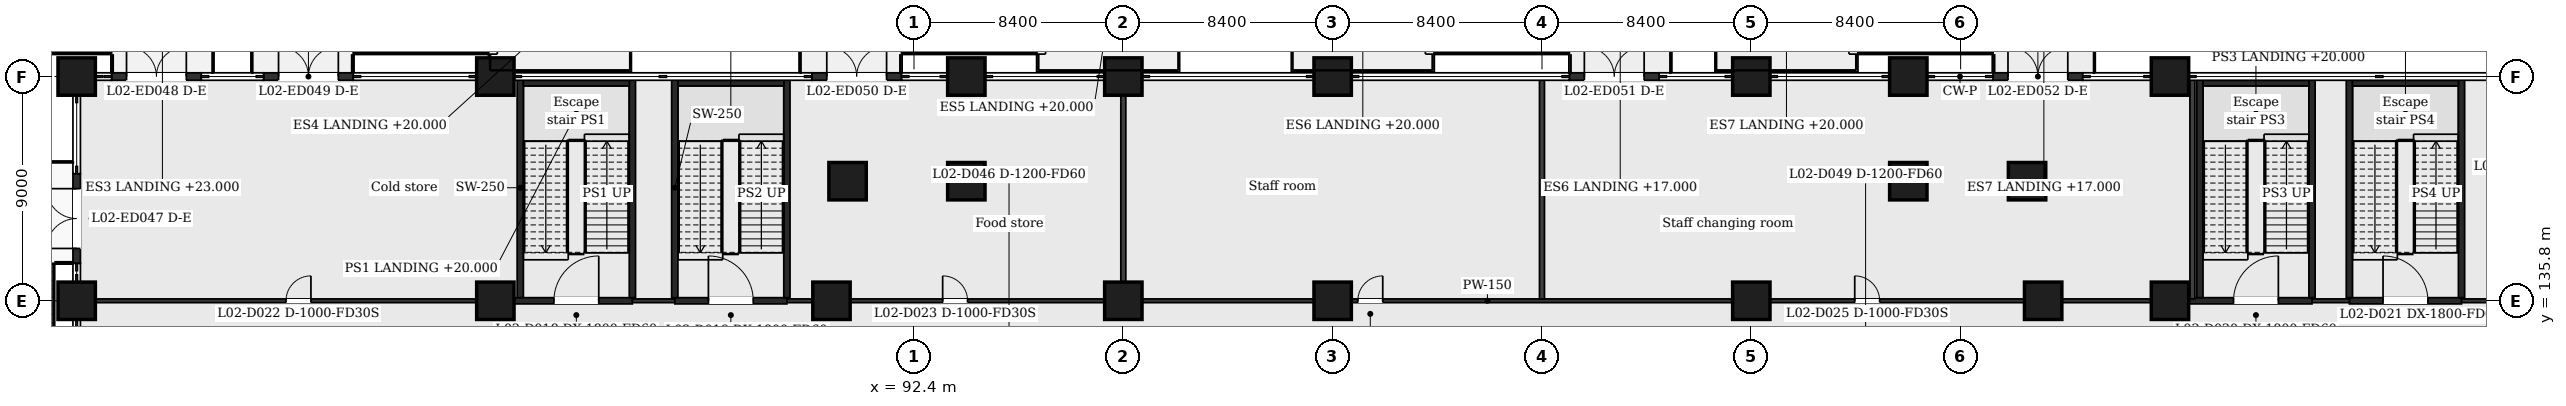
"""IFC4 building model, lengths in metres.
Left out: names, types, materials, properties, quantities, classifications, styles, units other than length and angle.
Written with IfcOpenShell. Run it as: python <this file> out.ifc"""

import sys

from ifc_helpers import new_model, si_unit, direction, frame, frame_2d, origin, origin_2d, place, context, subcontext, project, spatial, rectangle, extrude, element, fill, save


model = new_model("IFC4")
c1 = context("Model", 3, precision=1e-05, world=origin(), true_north=direction((0.0, 1.0)))
c2 = subcontext(c1, "Body", "Model", "MODEL_VIEW")
j1 = project(units=[si_unit("LENGTHUNIT", "METRE"), si_unit("PLANEANGLEUNIT", "RADIAN")], contexts=[c1])
p1 = place(None, origin())
s1 = spatial("IfcSite", under=j1, at=p1, CompositionType="ELEMENT")
p2 = place(p1, origin())
s2 = spatial("IfcBuilding", under=s1, at=p2, CompositionType="ELEMENT")
p3 = place(p2, frame((0.0, 0.0, 17.0)))
s3 = spatial("IfcBuildingStorey", under=s2, at=p3, CompositionType="ELEMENT", Elevation=17.0)
for number, where, z_axis, x_axis in (
    (1, (58.8, 135.8, 0.0), (0.0, 0.0, 1.0), (1.0, 0.0, 0.0)),
    (2, (75.6, 135.8, 0.0), (0.0, 0.0, 1.0), (1.0, 0.0, 0.0)),
    (3, (89.088, 135.8, 0.0), (0.0, 0.0, 1.0), (1.0, 0.0, 0.0)),
    (4, (100.8, 135.8, 0.0), (0.0, 0.0, 1.0), (1.0, 0.0, 0.0)),
    (5, (109.2, 135.8, 0.0), (0.0, 0.0, 1.0), (1.0, 0.0, 0.0)),
    (6, (126.0, 135.8, 0.0), (0.0, 0.0, 1.0), (1.0, 0.0, 0.0)),
    (7, (137.711, 135.8, 0.0), (0.0, 0.0, 1.0), (1.0, 0.0, 0.0)),
    (8, (142.8, 135.8, 0.0), (0.0, 0.0, 1.0), (1.0, 0.0, 0.0)),
    (9, (89.735, 140.6, 0.0), (0.0, 0.0, 1.0), (1.0, 0.0, 0.0)),
    (10, (94.5, 140.6, 0.0), (0.0, 0.0, 1.0), (1.0, 0.0, 0.0)),
    (11, (132.3, 140.6, 0.0), (0.0, 0.0, 1.0), (1.0, 0.0, 0.0)),
    (12, (137.065, 140.6, 0.0), (0.0, 0.0, 1.0), (1.0, 0.0, 0.0)),
    (13, (58.8, 144.8, 0.0), (0.0, 0.0, 1.0), (1.0, 0.0, 0.0)),
    (14, (75.6, 144.8, 0.0), (0.0, 0.0, 1.0), (1.0, 0.0, 0.0)),
    (15, (94.5, 144.8, 0.0), (0.0, 0.0, 1.0), (1.0, 0.0, 0.0)),
    (16, (100.8, 144.8, 0.0), (0.0, 0.0, 1.0), (1.0, 0.0, 0.0)),
    (17, (109.2, 144.8, 0.0), (0.0, 0.0, 1.0), (1.0, 0.0, 0.0)),
    (18, (126.0, 144.8, 0.0), (0.0, 0.0, 1.0), (1.0, 0.0, 0.0)),
    (19, (132.3, 144.8, 0.0), (0.0, 0.0, 1.0), (1.0, 0.0, 0.0)),
    (20, (142.8, 144.8, 0.0), (0.0, 0.0, 1.0), (1.0, 0.0, 0.0)),
):
    element("IfcColumn", number, at=place(p3, frame(where, z_axis=z_axis, x_axis=x_axis)), inside=s3, PredefinedType="COLUMN", context=c2, shape_type="SweptSolid", body=[
        extrude(rectangle(XDim=1.5, YDim=1.5, at=origin_2d()), origin(), (0.0, 0.0, 1.0), 6.0),
    ])
p4 = place(p3, frame((58.8, 137.3, 0.0), z_axis=(0.0, 0.0, 1.0), x_axis=(0.0, 1.0, 0.0)))
e21 = element("IfcWall", 21, at=p4, inside=s3, PredefinedType="SOLIDWALL", context=c2, shape_type="SweptSolid", body=[
    extrude(rectangle(XDim=3.6, YDim=0.3, at=frame_2d((1.8, 0.0))), origin(), (0.0, 0.0, 1.0), 5.1),
])
p5 = place(p4, frame((0.6, 0.0, 0.0)))
e22 = element("IfcOpeningElement", 22, at=p5, cuts=e21, PredefinedType="OPENING", context=c2, shape_type="SweptSolid", body=[
    extrude(rectangle(XDim=2.4, YDim=2.4, at=frame_2d((1.2, 1.2))), frame((0.0, 0.16, 0.0), z_axis=(0.0, -1.0, 0.0), x_axis=(1.0, 0.0, 0.0)), (0.0, 0.0, 1.0), 0.32),
])
p6 = place(p3, frame((60.2, 144.8, 0.0), z_axis=(0.0, 0.0, 1.0), x_axis=(1.0, 0.0, 0.0)))
e23 = element("IfcWall", 23, at=p6, inside=s3, PredefinedType="SOLIDWALL", context=c2, shape_type="SweptSolid", body=[
    extrude(rectangle(XDim=3.6, YDim=0.3, at=frame_2d((1.8, 0.0))), origin(), (0.0, 0.0, 1.0), 5.1),
])
p7 = place(p6, frame((0.6, 0.0, 0.0)))
e24 = element("IfcOpeningElement", 24, at=p7, cuts=e23, PredefinedType="OPENING", context=c2, shape_type="SweptSolid", body=[
    extrude(rectangle(XDim=2.4, YDim=2.4, at=frame_2d((1.2, 1.2))), frame((0.0, 0.16, 0.0), z_axis=(0.0, -1.0, 0.0), x_axis=(1.0, 0.0, 0.0)), (0.0, 0.0, 1.0), 0.32),
])
p8 = place(p3, frame((66.3, 144.8, 0.0), z_axis=(0.0, 0.0, 1.0), x_axis=(1.0, 0.0, 0.0)))
e25 = element("IfcWall", 25, at=p8, inside=s3, PredefinedType="SOLIDWALL", context=c2, shape_type="SweptSolid", body=[
    extrude(rectangle(XDim=3.6, YDim=0.3, at=frame_2d((1.8, 0.0))), origin(), (0.0, 0.0, 1.0), 5.1),
])
p9 = place(p8, frame((0.6, 0.0, 0.0)))
e26 = element("IfcOpeningElement", 26, at=p9, cuts=e25, PredefinedType="OPENING", context=c2, shape_type="SweptSolid", body=[
    extrude(rectangle(XDim=2.4, YDim=2.4, at=frame_2d((1.2, 1.2))), frame((0.0, 0.16, 0.0), z_axis=(0.0, -1.0, 0.0), x_axis=(1.0, 0.0, 0.0)), (0.0, 0.0, 1.0), 0.32),
])
p10 = place(p3, frame((88.3, 144.8, 0.0), z_axis=(0.0, 0.0, 1.0), x_axis=(1.0, 0.0, 0.0)))
e27 = element("IfcWall", 27, at=p10, inside=s3, PredefinedType="SOLIDWALL", context=c2, shape_type="SweptSolid", body=[
    extrude(rectangle(XDim=3.6, YDim=0.3, at=frame_2d((1.8, 0.0))), origin(), (0.0, 0.0, 1.0), 5.1),
])
p11 = place(p10, frame((0.6, 0.0, 0.0)))
e28 = element("IfcOpeningElement", 28, at=p11, cuts=e27, PredefinedType="OPENING", context=c2, shape_type="SweptSolid", body=[
    extrude(rectangle(XDim=2.4, YDim=2.4, at=frame_2d((1.2, 1.2))), frame((0.0, 0.16, 0.0), z_axis=(0.0, -1.0, 0.0), x_axis=(1.0, 0.0, 0.0)), (0.0, 0.0, 1.0), 0.32),
])
p12 = place(p3, frame((118.7, 144.8, 0.0), z_axis=(0.0, 0.0, 1.0), x_axis=(1.0, 0.0, 0.0)))
e29 = element("IfcWall", 29, at=p12, inside=s3, PredefinedType="SOLIDWALL", context=c2, shape_type="SweptSolid", body=[
    extrude(rectangle(XDim=3.6, YDim=0.3, at=frame_2d((1.8, 0.0))), origin(), (0.0, 0.0, 1.0), 5.1),
])
p13 = place(p12, frame((0.6, 0.0, 0.0)))
e30 = element("IfcOpeningElement", 30, at=p13, cuts=e29, PredefinedType="OPENING", context=c2, shape_type="SweptSolid", body=[
    extrude(rectangle(XDim=2.4, YDim=2.4, at=frame_2d((1.2, 1.2))), frame((0.0, 0.16, 0.0), z_axis=(0.0, -1.0, 0.0), x_axis=(1.0, 0.0, 0.0)), (0.0, 0.0, 1.0), 0.32),
])
p14 = place(p3, frame((135.7, 144.8, 0.0), z_axis=(0.0, 0.0, 1.0), x_axis=(1.0, 0.0, 0.0)))
e31 = element("IfcWall", 31, at=p14, inside=s3, PredefinedType="SOLIDWALL", context=c2, shape_type="SweptSolid", body=[
    extrude(rectangle(XDim=3.6, YDim=0.3, at=frame_2d((1.8, 0.0))), origin(), (0.0, 0.0, 1.0), 5.1),
])
p15 = place(p14, frame((0.6, 0.0, 0.0)))
e32 = element("IfcOpeningElement", 32, at=p15, cuts=e31, PredefinedType="OPENING", context=c2, shape_type="SweptSolid", body=[
    extrude(rectangle(XDim=2.4, YDim=2.4, at=frame_2d((1.2, 1.2))), frame((0.0, 0.16, 0.0), z_axis=(0.0, -1.0, 0.0), x_axis=(1.0, 0.0, 0.0)), (0.0, 0.0, 1.0), 0.32),
])
p16 = place(p3, frame((76.32, 135.8, 0.0), z_axis=(0.0, 0.0, 1.0), x_axis=(1.0, 0.0, 0.0)))
e33 = element("IfcWall", 33, at=p16, inside=s3, PredefinedType="PARTITIONING", context=c2, shape_type="SweptSolid", body=[
    extrude(rectangle(XDim=4.78, YDim=0.25, at=frame_2d((2.39, 0.0))), origin(), (0.0, 0.0, 1.0), 5.5),
])
p17 = place(p16, frame((1.63, 0.0, 0.0)))
e34 = element("IfcOpeningElement", 34, at=p17, cuts=e33, PredefinedType="OPENING", context=c2, shape_type="SweptSolid", body=[
    extrude(rectangle(XDim=1.8, YDim=2.1, at=frame_2d((0.9, 1.05))), frame((0.0, 0.135, 0.0), z_axis=(0.0, -1.0, 0.0), x_axis=(1.0, 0.0, 0.0)), (0.0, 0.0, 1.0), 0.27),
])
p18 = place(p3, frame((82.8, 135.8, 0.0), z_axis=(0.0, 0.0, 1.0), x_axis=(1.0, 0.0, 0.0)))
e35 = element("IfcWall", 35, at=p18, inside=s3, PredefinedType="PARTITIONING", context=c2, shape_type="SweptSolid", body=[
    extrude(rectangle(XDim=4.5, YDim=0.25, at=frame_2d((2.25, 0.0))), origin(), (0.0, 0.0, 1.0), 5.5),
])
p19 = place(p18, frame((1.35, 0.0, 0.0)))
e36 = element("IfcOpeningElement", 36, at=p19, cuts=e35, PredefinedType="OPENING", context=c2, shape_type="SweptSolid", body=[
    extrude(rectangle(XDim=1.8, YDim=2.1, at=frame_2d((0.9, 1.05))), frame((0.0, 0.135, 0.0), z_axis=(0.0, -1.0, 0.0), x_axis=(1.0, 0.0, 0.0)), (0.0, 0.0, 1.0), 0.27),
])
p20 = place(p3, frame((143.52, 135.8, 0.0), z_axis=(0.0, 0.0, 1.0), x_axis=(1.0, 0.0, 0.0)))
e37 = element("IfcWall", 37, at=p20, inside=s3, PredefinedType="PARTITIONING", context=c2, shape_type="SweptSolid", body=[
    extrude(rectangle(XDim=4.98, YDim=0.25, at=frame_2d((2.49, 0.0))), origin(), (0.0, 0.0, 1.0), 5.5),
])
p21 = place(p20, frame((1.83, 0.0, 0.0)))
e38 = element("IfcOpeningElement", 38, at=p21, cuts=e37, PredefinedType="OPENING", context=c2, shape_type="SweptSolid", body=[
    extrude(rectangle(XDim=1.8, YDim=2.1, at=frame_2d((0.9, 1.05))), frame((0.0, 0.135, 0.0), z_axis=(0.0, -1.0, 0.0), x_axis=(1.0, 0.0, 0.0)), (0.0, 0.0, 1.0), 0.27),
])
p22 = place(p3, frame((150.0, 135.8, 0.0), z_axis=(0.0, 0.0, 1.0), x_axis=(1.0, 0.0, 0.0)))
e39 = element("IfcWall", 39, at=p22, inside=s3, PredefinedType="PARTITIONING", context=c2, shape_type="SweptSolid", body=[
    extrude(rectangle(XDim=4.5, YDim=0.25, at=frame_2d((2.25, 0.0))), origin(), (0.0, 0.0, 1.0), 5.5),
])
p23 = place(p22, frame((1.35, 0.0, 0.0)))
e40 = element("IfcOpeningElement", 40, at=p23, cuts=e39, PredefinedType="OPENING", context=c2, shape_type="SweptSolid", body=[
    extrude(rectangle(XDim=1.8, YDim=2.1, at=frame_2d((0.9, 1.05))), frame((0.0, 0.135, 0.0), z_axis=(0.0, -1.0, 0.0), x_axis=(1.0, 0.0, 0.0)), (0.0, 0.0, 1.0), 0.27),
])
p24 = place(p3, frame((58.85, 135.8, 0.0), z_axis=(0.0, 0.0, 1.0), x_axis=(1.0, 0.0, 0.0)))
e41 = element("IfcWall", 41, at=p24, inside=s3, PredefinedType="PARTITIONING", context=c2, shape_type="SweptSolid", body=[
    extrude(rectangle(XDim=17.47, YDim=0.15, at=frame_2d((8.735, 0.0))), origin(), (0.0, 0.0, 1.0), 5.5),
])
p25 = place(p24, frame((8.35, 0.0, 0.0)))
e42 = element("IfcOpeningElement", 42, at=p25, cuts=e41, PredefinedType="OPENING", context=c2, shape_type="SweptSolid", body=[
    extrude(rectangle(XDim=1.0, YDim=2.1, at=frame_2d((0.5, 1.05))), frame((0.0, 0.085, 0.0), z_axis=(0.0, -1.0, 0.0), x_axis=(1.0, 0.0, 0.0)), (0.0, 0.0, 1.0), 0.17),
])
p26 = place(p3, frame((81.1, 135.8, 0.0), z_axis=(0.0, 0.0, 1.0), x_axis=(1.0, 0.0, 0.0)))
e43 = element("IfcWall", 43, at=p26, inside=s3, PredefinedType="PARTITIONING", context=c2, shape_type="SweptSolid", body=[
    extrude(rectangle(XDim=1.7, YDim=0.15, at=frame_2d((0.85, 0.0))), origin(), (0.0, 0.0, 1.0), 5.5),
])
p27 = place(p3, frame((87.3, 135.8, 0.0), z_axis=(0.0, 0.0, 1.0), x_axis=(1.0, 0.0, 0.0)))
e44 = element("IfcWall", 44, at=p27, inside=s3, PredefinedType="PARTITIONING", context=c2, shape_type="SweptSolid", body=[
    extrude(rectangle(XDim=56.22, YDim=0.15, at=frame_2d((28.11, 0.0))), origin(), (0.0, 0.0, 1.0), 5.5),
])
p28 = place(p27, frame((6.25, 0.0, 0.0)))
e45 = element("IfcOpeningElement", 45, at=p28, cuts=e44, PredefinedType="OPENING", context=c2, shape_type="SweptSolid", body=[
    extrude(rectangle(XDim=1.0, YDim=2.1, at=frame_2d((0.5, 1.05))), frame((0.0, 0.085, 0.0), z_axis=(0.0, -1.0, 0.0), x_axis=(1.0, 0.0, 0.0)), (0.0, 0.0, 1.0), 0.17),
])
p29 = place(p27, frame((22.91, 0.0, 0.0)))
e46 = element("IfcOpeningElement", 46, at=p29, cuts=e44, PredefinedType="OPENING", context=c2, shape_type="SweptSolid", body=[
    extrude(rectangle(XDim=1.0, YDim=2.1, at=frame_2d((0.5, 1.05))), frame((0.0, 0.085, 0.0), z_axis=(0.0, -1.0, 0.0), x_axis=(1.0, 0.0, 0.0)), (0.0, 0.0, 1.0), 0.17),
])
p30 = place(p27, frame((42.85, 0.0, 0.0)))
e47 = element("IfcOpeningElement", 47, at=p30, cuts=e44, PredefinedType="OPENING", context=c2, shape_type="SweptSolid", body=[
    extrude(rectangle(XDim=1.0, YDim=2.1, at=frame_2d((0.5, 1.05))), frame((0.0, 0.085, 0.0), z_axis=(0.0, -1.0, 0.0), x_axis=(1.0, 0.0, 0.0)), (0.0, 0.0, 1.0), 0.17),
])
p31 = place(p3, frame((148.5, 135.8, 0.0), z_axis=(0.0, 0.0, 1.0), x_axis=(1.0, 0.0, 0.0)))
e48 = element("IfcWall", 48, at=p31, inside=s3, PredefinedType="PARTITIONING", context=c2, shape_type="SweptSolid", body=[
    extrude(rectangle(XDim=1.5, YDim=0.15, at=frame_2d((0.75, 0.0))), origin(), (0.0, 0.0, 1.0), 5.5),
])
p32 = place(p3, frame((154.5, 135.8, 0.0), z_axis=(0.0, 0.0, 1.0), x_axis=(1.0, 0.0, 0.0)))
e49 = element("IfcWall", 49, at=p32, inside=s3, PredefinedType="PARTITIONING", context=c2, shape_type="SweptSolid", body=[
    extrude(rectangle(XDim=5.05, YDim=0.15, at=frame_2d((2.525, 0.0))), origin(), (0.0, 0.0, 1.0), 5.5),
])
for number, where, z_axis, x_axis in (
    (50, (76.6, 135.925, 0.0), (0.0, 0.0, 1.0), (0.0, 1.0, 0.0)),
    (51, (81.1, 135.925, 0.0), (0.0, 0.0, 1.0), (0.0, 1.0, 0.0)),
    (52, (82.8, 135.925, 0.0), (0.0, 0.0, 1.0), (0.0, 1.0, 0.0)),
    (53, (87.3, 135.925, 0.0), (0.0, 0.0, 1.0), (0.0, 1.0, 0.0)),
):
    element("IfcWall", number, at=place(p3, frame(where, z_axis=z_axis, x_axis=x_axis)), inside=s3, PredefinedType="PARTITIONING", context=c2, shape_type="SweptSolid", body=[
        extrude(rectangle(XDim=8.825, YDim=0.25, at=frame_2d((4.413, 0.0))), origin(), (0.0, 0.0, 1.0), 5.5),
    ])
for number, where, z_axis, x_axis in (
    (54, (100.8, 135.875, 0.0), (0.0, 0.0, 1.0), (0.0, 1.0, 0.0)),
    (55, (117.6, 135.875, 0.0), (0.0, 0.0, 1.0), (0.0, 1.0, 0.0)),
    (56, (143.7, 135.875, 0.0), (0.0, 0.0, 1.0), (0.0, 1.0, 0.0)),
):
    element("IfcWall", number, at=place(p3, frame(where, z_axis=z_axis, x_axis=x_axis)), inside=s3, PredefinedType="PARTITIONING", context=c2, shape_type="SweptSolid", body=[
        extrude(rectangle(XDim=8.875, YDim=0.2, at=frame_2d((4.438, 0.0))), origin(), (0.0, 0.0, 1.0), 5.5),
    ])
for number, where, z_axis, x_axis in (
    (57, (144.0, 135.925, 0.0), (0.0, 0.0, 1.0), (0.0, 1.0, 0.0)),
    (58, (148.5, 135.925, 0.0), (0.0, 0.0, 1.0), (0.0, 1.0, 0.0)),
    (59, (150.0, 135.925, 0.0), (0.0, 0.0, 1.0), (0.0, 1.0, 0.0)),
    (60, (154.5, 135.925, 0.0), (0.0, 0.0, 1.0), (0.0, 1.0, 0.0)),
):
    element("IfcWall", number, at=place(p3, frame(where, z_axis=z_axis, x_axis=x_axis)), inside=s3, PredefinedType="PARTITIONING", context=c2, shape_type="SweptSolid", body=[
        extrude(rectangle(XDim=8.825, YDim=0.25, at=frame_2d((4.413, 0.0))), origin(), (0.0, 0.0, 1.0), 5.5),
    ])
for number, where, z_axis, x_axis in (
    (61, (76.725, 144.538, 0.0), (0.0, 0.0, 1.0), (1.0, 0.0, 0.0)),
    (62, (82.925, 144.538, 0.0), (0.0, 0.0, 1.0), (1.0, 0.0, 0.0)),
    (63, (144.125, 144.538, 0.0), (0.0, 0.0, 1.0), (1.0, 0.0, 0.0)),
    (64, (150.125, 144.538, 0.0), (0.0, 0.0, 1.0), (1.0, 0.0, 0.0)),
):
    element("IfcWall", number, at=place(p3, frame(where, z_axis=z_axis, x_axis=x_axis)), inside=s3, PredefinedType="PARTITIONING", context=c2, shape_type="SweptSolid", body=[
        extrude(rectangle(XDim=4.25, YDim=0.225, at=frame_2d((2.125, 0.0))), origin(), (0.0, 0.0, 1.0), 5.5),
    ])
p33 = place(p5, origin())
e65 = element("IfcDoor", 65, at=p33, inside=s3, OperationType="DOUBLE_DOOR_DOUBLE_SWING", PredefinedType="DOOR", context=c2, shape_type="SweptSolid", body=[
    extrude(rectangle(XDim=2.4, YDim=2.4, at=frame_2d((1.2, 1.2))), frame((0.0, 0.025, 0.0), z_axis=(0.0, -1.0, 0.0), x_axis=(1.0, 0.0, 0.0)), (0.0, 0.0, 1.0), 0.05),
])
fill(e22, e65)
p34 = place(p7, origin())
e66 = element("IfcDoor", 66, at=p34, inside=s3, OperationType="DOUBLE_DOOR_DOUBLE_SWING", PredefinedType="DOOR", context=c2, shape_type="SweptSolid", body=[
    extrude(rectangle(XDim=2.4, YDim=2.4, at=frame_2d((1.2, 1.2))), frame((0.0, 0.025, 0.0), z_axis=(0.0, -1.0, 0.0), x_axis=(1.0, 0.0, 0.0)), (0.0, 0.0, 1.0), 0.05),
])
fill(e24, e66)
p35 = place(p9, origin())
e67 = element("IfcDoor", 67, at=p35, inside=s3, OperationType="DOUBLE_DOOR_DOUBLE_SWING", PredefinedType="DOOR", context=c2, shape_type="SweptSolid", body=[
    extrude(rectangle(XDim=2.4, YDim=2.4, at=frame_2d((1.2, 1.2))), frame((0.0, 0.025, 0.0), z_axis=(0.0, -1.0, 0.0), x_axis=(1.0, 0.0, 0.0)), (0.0, 0.0, 1.0), 0.05),
])
fill(e26, e67)
p36 = place(p11, origin())
e68 = element("IfcDoor", 68, at=p36, inside=s3, OperationType="DOUBLE_DOOR_DOUBLE_SWING", PredefinedType="DOOR", context=c2, shape_type="SweptSolid", body=[
    extrude(rectangle(XDim=2.4, YDim=2.4, at=frame_2d((1.2, 1.2))), frame((0.0, 0.025, 0.0), z_axis=(0.0, -1.0, 0.0), x_axis=(1.0, 0.0, 0.0)), (0.0, 0.0, 1.0), 0.05),
])
fill(e28, e68)
p37 = place(p13, origin())
e69 = element("IfcDoor", 69, at=p37, inside=s3, OperationType="DOUBLE_DOOR_DOUBLE_SWING", PredefinedType="DOOR", context=c2, shape_type="SweptSolid", body=[
    extrude(rectangle(XDim=2.4, YDim=2.4, at=frame_2d((1.2, 1.2))), frame((0.0, 0.025, 0.0), z_axis=(0.0, -1.0, 0.0), x_axis=(1.0, 0.0, 0.0)), (0.0, 0.0, 1.0), 0.05),
])
fill(e30, e69)
p38 = place(p15, origin())
e70 = element("IfcDoor", 70, at=p38, inside=s3, OperationType="DOUBLE_DOOR_DOUBLE_SWING", PredefinedType="DOOR", context=c2, shape_type="SweptSolid", body=[
    extrude(rectangle(XDim=2.4, YDim=2.4, at=frame_2d((1.2, 1.2))), frame((0.0, 0.025, 0.0), z_axis=(0.0, -1.0, 0.0), x_axis=(1.0, 0.0, 0.0)), (0.0, 0.0, 1.0), 0.05),
])
fill(e32, e70)
p39 = place(p17, origin())
e71 = element("IfcDoor", 71, at=p39, inside=s3, OperationType="SINGLE_SWING_RIGHT", PredefinedType="DOOR", context=c2, shape_type="SweptSolid", body=[
    extrude(rectangle(XDim=1.8, YDim=2.1, at=frame_2d((0.9, 1.05))), frame((0.0, 0.025, 0.0), z_axis=(0.0, -1.0, 0.0), x_axis=(1.0, 0.0, 0.0)), (0.0, 0.0, 1.0), 0.05),
])
fill(e34, e71)
p40 = place(p19, origin())
e72 = element("IfcDoor", 72, at=p40, inside=s3, OperationType="SINGLE_SWING_LEFT", PredefinedType="DOOR", context=c2, shape_type="SweptSolid", body=[
    extrude(rectangle(XDim=1.8, YDim=2.1, at=frame_2d((0.9, 1.05))), frame((0.0, 0.025, 0.0), z_axis=(0.0, -1.0, 0.0), x_axis=(1.0, 0.0, 0.0)), (0.0, 0.0, 1.0), 0.05),
])
fill(e36, e72)
p41 = place(p21, origin())
e73 = element("IfcDoor", 73, at=p41, inside=s3, OperationType="SINGLE_SWING_RIGHT", PredefinedType="DOOR", context=c2, shape_type="SweptSolid", body=[
    extrude(rectangle(XDim=1.8, YDim=2.1, at=frame_2d((0.9, 1.05))), frame((0.0, 0.025, 0.0), z_axis=(0.0, -1.0, 0.0), x_axis=(1.0, 0.0, 0.0)), (0.0, 0.0, 1.0), 0.05),
])
fill(e38, e73)
p42 = place(p23, origin())
e74 = element("IfcDoor", 74, at=p42, inside=s3, OperationType="SINGLE_SWING_LEFT", PredefinedType="DOOR", context=c2, shape_type="SweptSolid", body=[
    extrude(rectangle(XDim=1.8, YDim=2.1, at=frame_2d((0.9, 1.05))), frame((0.0, 0.025, 0.0), z_axis=(0.0, -1.0, 0.0), x_axis=(1.0, 0.0, 0.0)), (0.0, 0.0, 1.0), 0.05),
])
fill(e40, e74)
p43 = place(p25, origin())
e75 = element("IfcDoor", 75, at=p43, inside=s3, OperationType="SINGLE_SWING_RIGHT", PredefinedType="DOOR", context=c2, shape_type="SweptSolid", body=[
    extrude(rectangle(XDim=1.0, YDim=2.1, at=frame_2d((0.5, 1.05))), frame((0.0, 0.025, 0.0), z_axis=(0.0, -1.0, 0.0), x_axis=(1.0, 0.0, 0.0)), (0.0, 0.0, 1.0), 0.05),
])
fill(e42, e75)
p44 = place(p28, origin())
e76 = element("IfcDoor", 76, at=p44, inside=s3, OperationType="SINGLE_SWING_LEFT", PredefinedType="DOOR", context=c2, shape_type="SweptSolid", body=[
    extrude(rectangle(XDim=1.0, YDim=2.1, at=frame_2d((0.5, 1.05))), frame((0.0, 0.025, 0.0), z_axis=(0.0, -1.0, 0.0), x_axis=(1.0, 0.0, 0.0)), (0.0, 0.0, 1.0), 0.05),
])
fill(e45, e76)
p45 = place(p29, origin())
e77 = element("IfcDoor", 77, at=p45, inside=s3, OperationType="SINGLE_SWING_RIGHT", PredefinedType="DOOR", context=c2, shape_type="SweptSolid", body=[
    extrude(rectangle(XDim=1.0, YDim=2.1, at=frame_2d((0.5, 1.05))), frame((0.0, 0.025, 0.0), z_axis=(0.0, -1.0, 0.0), x_axis=(1.0, 0.0, 0.0)), (0.0, 0.0, 1.0), 0.05),
])
fill(e46, e77)
p46 = place(p30, origin())
e78 = element("IfcDoor", 78, at=p46, inside=s3, OperationType="SINGLE_SWING_LEFT", PredefinedType="DOOR", context=c2, shape_type="SweptSolid", body=[
    extrude(rectangle(XDim=1.0, YDim=2.1, at=frame_2d((0.5, 1.05))), frame((0.0, 0.025, 0.0), z_axis=(0.0, -1.0, 0.0), x_axis=(1.0, 0.0, 0.0)), (0.0, 0.0, 1.0), 0.05),
])
fill(e47, e78)
save(model, sys.argv[1])
